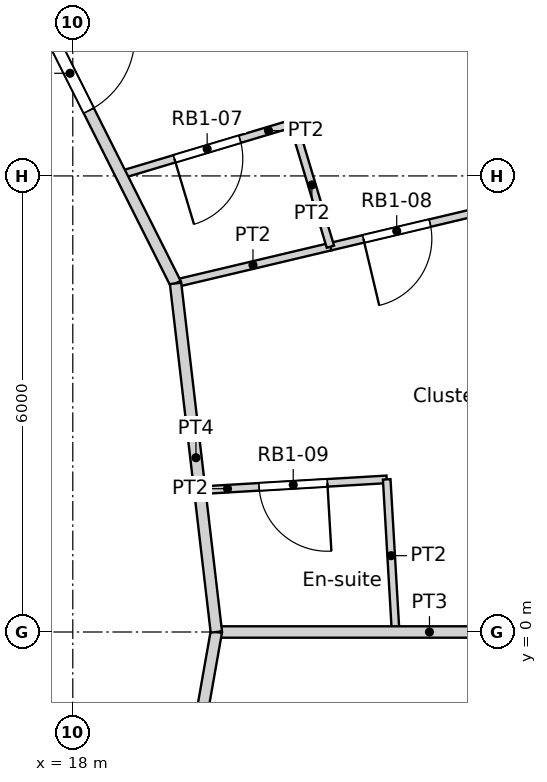
"""IFC4 building model, lengths in metres.
Left out: names, types, materials, properties, quantities, classifications, styles, units other than length and angle.
Written with IfcOpenShell. Run it as: python <this file> out.ifc"""

import sys

from ifc_helpers import new_model, si_unit, direction, frame, frame_2d, origin, origin_2d, place, context, subcontext, project, spatial, rectangle, circle, extrude, element, fill, save


model = new_model("IFC4")
c1 = context("Model", 3, precision=1e-05, world=origin(), true_north=direction((0.0, 1.0)))
c2 = subcontext(c1, "Body", "Model", "MODEL_VIEW")
j1 = project(units=[si_unit("LENGTHUNIT", "METRE"), si_unit("PLANEANGLEUNIT", "RADIAN")], contexts=[c1])
p1 = place(None, origin())
s1 = spatial("IfcSite", under=j1, at=p1, CompositionType="ELEMENT")
p2 = place(p1, origin())
s2 = spatial("IfcBuilding", under=s1, at=p2, CompositionType="ELEMENT")
p3 = place(p2, frame((0.0, 0.0, 126.0)))
s3 = spatial("IfcBuildingStorey", under=s2, at=p3, CompositionType="ELEMENT", Elevation=126.0)
for number, where, z_axis, x_axis in (
    (1, (18.822, 0.0, 0.0), (0.0, 0.0, 1.0), (1.0, 0.0, 0.0)),
    (2, (17.986, 5.548, 0.0), (0.0, 0.0, 1.0), (1.0, 0.0, 0.0)),
):
    element("IfcColumn", number, at=place(p3, frame(where, z_axis=z_axis, x_axis=x_axis)), inside=s3, PredefinedType="COLUMN", context=c2, shape_type="SweptSolid", body=[
        extrude(circle(Radius=0.65, at=origin_2d()), origin(), (0.0, 0.0, 1.0), 3.6),
    ])
p4 = place(p3, frame((15.235, 12.784, 0.0), z_axis=(0.0, 0.0, 1.0), x_axis=(0.448809691484, -0.893627361281, 0.0)))
e3 = element("IfcWall", 3, at=p4, inside=s3, PredefinedType="PARTITIONING", context=c2, shape_type="SweptSolid", body=[
    extrude(rectangle(XDim=9.174, YDim=0.15, at=frame_2d((4.587, 0.0))), origin(), (0.0, 0.0, 1.0), 3.3),
])
p5 = place(p4, frame((5.53, 0.0, 0.0)))
e4 = element("IfcOpeningElement", 4, at=p5, cuts=e3, PredefinedType="OPENING", context=c2, shape_type="SweptSolid", body=[
    extrude(rectangle(XDim=1.1, YDim=2.1, at=frame_2d((0.55, 1.05))), frame((0.0, 0.075, 0.0), z_axis=(0.0, -1.0, 0.0), x_axis=(1.0, 0.0, 0.0)), (0.0, 0.0, 1.0), 0.15),
])
p6 = place(p3, frame((19.352, 4.586, 0.0), z_axis=(0.0, 0.0, 1.0), x_axis=(0.116221510549, -0.993223318537, 0.0)))
e5 = element("IfcWall", 5, at=p6, inside=s3, PredefinedType="PARTITIONING", context=c2, shape_type="SweptSolid", body=[
    extrude(rectangle(XDim=4.617, YDim=0.15, at=frame_2d((2.309, 0.0))), origin(), (0.0, 0.0, 1.0), 3.3),
])
p7 = place(p3, frame((18.688, -6.802, 0.0), z_axis=(0.0, 0.0, 1.0), x_axis=(0.173728873845, 0.98479352069, 0.0)))
e6 = element("IfcWall", 6, at=p7, inside=s3, PredefinedType="PARTITIONING", context=c2, shape_type="SweptSolid", body=[
    extrude(rectangle(XDim=6.907, YDim=0.15, at=frame_2d((3.454, 0.0))), origin(), (0.0, 0.0, 1.0), 3.3),
])
p8 = place(p7, frame((2.953, 0.0, 0.0)))
e7 = element("IfcOpeningElement", 7, at=p8, cuts=e6, PredefinedType="OPENING", context=c2, shape_type="SweptSolid", body=[
    extrude(rectangle(XDim=1.0, YDim=2.04, at=frame_2d((0.5, 1.02))), frame((0.0, 0.075, 0.0), z_axis=(0.0, -1.0, 0.0), x_axis=(1.0, 0.0, 0.0)), (0.0, 0.0, 1.0), 0.15),
])
p9 = place(p3, frame((20.902, 6.694, 0.0), z_axis=(0.0, 0.0, 1.0), x_axis=(0.286978159246, -0.957937125346, 0.0)))
e8 = element("IfcWall", 8, at=p9, inside=s3, PredefinedType="PARTITIONING", context=c2, shape_type="SweptSolid", body=[
    extrude(rectangle(XDim=1.696, YDim=0.1, at=frame_2d((0.848, 0.0))), origin(), (0.0, 0.0, 1.0), 3.3),
])
p10 = place(p3, frame((18.634, 6.015, 0.0), z_axis=(0.0, 0.0, 1.0), x_axis=(0.957968074201, 0.286874831262, 0.0)))
e9 = element("IfcWall", 9, at=p10, inside=s3, PredefinedType="PARTITIONING", context=c2, shape_type="SweptSolid", body=[
    extrude(rectangle(XDim=2.368, YDim=0.1, at=frame_2d((1.184, 0.0))), origin(), (0.0, 0.0, 1.0), 3.3),
])
p11 = place(p10, frame((0.733, 0.0, 0.0)))
e10 = element("IfcOpeningElement", 10, at=p11, cuts=e9, PredefinedType="OPENING", context=c2, shape_type="SweptSolid", body=[
    extrude(rectangle(XDim=0.9, YDim=2.0, at=frame_2d((0.45, 1.0))), frame((0.0, 0.05, 0.0), z_axis=(0.0, -1.0, 0.0), x_axis=(1.0, 0.0, 0.0)), (0.0, 0.0, 1.0), 0.1),
])
p12 = place(p3, frame((21.389, 5.069, 0.0), z_axis=(0.0, 0.0, 1.0), x_axis=(0.973047083334, 0.2306065342, 0.0)))
e11 = element("IfcWall", 11, at=p12, inside=s3, PredefinedType="PARTITIONING", context=c2, shape_type="SweptSolid", body=[
    extrude(rectangle(XDim=3.516, YDim=0.1, at=frame_2d((1.758, 0.0))), origin(), (0.0, 0.0, 1.0), 3.3),
])
p13 = place(p12, frame((0.447, 0.0, 0.0)))
e12 = element("IfcOpeningElement", 12, at=p13, cuts=e11, PredefinedType="OPENING", context=c2, shape_type="SweptSolid", body=[
    extrude(rectangle(XDim=0.9, YDim=2.1, at=frame_2d((0.45, 1.05))), frame((0.0, 0.05, 0.0), z_axis=(0.0, -1.0, 0.0), x_axis=(1.0, 0.0, 0.0)), (0.0, 0.0, 1.0), 0.1),
])
p14 = place(p3, frame((19.352, 4.586, 0.0), z_axis=(0.0, 0.0, 1.0), x_axis=(0.973001078158, 0.230800567383, 0.0)))
e13 = element("IfcWall", 13, at=p14, inside=s3, PredefinedType="PARTITIONING", context=c2, shape_type="SweptSolid", body=[
    extrude(rectangle(XDim=2.094, YDim=0.1, at=frame_2d((1.047, 0.0))), origin(), (0.0, 0.0, 1.0), 3.3),
])
p15 = place(p3, frame((22.13, 2.008, 0.0), z_axis=(0.0, 0.0, 1.0), x_axis=(0.058259538708, -0.998301470574, 0.0)))
e14 = element("IfcWall", 14, at=p15, inside=s3, PredefinedType="PARTITIONING", context=c2, shape_type="SweptSolid", body=[
    extrude(rectangle(XDim=2.011, YDim=0.1, at=frame_2d((1.006, 0.0))), origin(), (0.0, 0.0, 1.0), 3.3),
])
p16 = place(p3, frame((19.67, 1.864, 0.0), z_axis=(0.0, 0.0, 1.0), x_axis=(0.998290052933, 0.058454856216, 0.0)))
e15 = element("IfcWall", 15, at=p16, inside=s3, PredefinedType="PARTITIONING", context=c2, shape_type="SweptSolid", body=[
    extrude(rectangle(XDim=2.464, YDim=0.1, at=frame_2d((1.232, 0.0))), origin(), (0.0, 0.0, 1.0), 3.3),
])
p17 = place(p16, frame((0.782, 0.0, 0.0)))
e16 = element("IfcOpeningElement", 16, at=p17, cuts=e15, PredefinedType="OPENING", context=c2, shape_type="SweptSolid", body=[
    extrude(rectangle(XDim=0.9, YDim=2.04, at=frame_2d((0.45, 1.02))), frame((0.0, 0.05, 0.0), z_axis=(0.0, -1.0, 0.0), x_axis=(1.0, 0.0, 0.0)), (0.0, 0.0, 1.0), 0.1),
])
p18 = place(p3, frame((19.888, 0.0, 0.0), z_axis=(0.0, 0.0, 1.0), x_axis=(1.0, 0.0, 0.0)))
e17 = element("IfcWall", 17, at=p18, inside=s3, PredefinedType="PARTITIONING", context=c2, shape_type="SweptSolid", body=[
    extrude(rectangle(XDim=5.609, YDim=0.15, at=frame_2d((2.805, 0.0))), origin(), (0.0, 0.0, 1.0), 3.3),
])
p19 = place(p5, origin())
e18 = element("IfcDoor", 18, at=p19, inside=s3, OperationType="SINGLE_SWING_LEFT", PredefinedType="DOOR", context=c2, shape_type="SweptSolid", body=[
    extrude(rectangle(XDim=1.1, YDim=2.1, at=frame_2d((0.55, 1.05))), frame((0.0, 0.025, 0.0), z_axis=(0.0, -1.0, 0.0), x_axis=(1.0, 0.0, 0.0)), (0.0, 0.0, 1.0), 0.05),
])
fill(e4, e18)
p20 = place(p11, origin())
e19 = element("IfcDoor", 19, at=p20, inside=s3, OperationType="SINGLE_SWING_RIGHT", PredefinedType="DOOR", context=c2, shape_type="SweptSolid", body=[
    extrude(rectangle(XDim=0.9, YDim=2.0, at=frame_2d((0.45, 1.0))), frame((0.0, 0.025, 0.0), z_axis=(0.0, -1.0, 0.0), x_axis=(1.0, 0.0, 0.0)), (0.0, 0.0, 1.0), 0.05),
])
fill(e10, e19)
p21 = place(p13, origin())
e20 = element("IfcDoor", 20, at=p21, inside=s3, OperationType="SINGLE_SWING_RIGHT", PredefinedType="DOOR", context=c2, shape_type="SweptSolid", body=[
    extrude(rectangle(XDim=0.9, YDim=2.1, at=frame_2d((0.45, 1.05))), frame((0.0, 0.025, 0.0), z_axis=(0.0, -1.0, 0.0), x_axis=(1.0, 0.0, 0.0)), (0.0, 0.0, 1.0), 0.05),
])
fill(e12, e20)
p22 = place(p17, origin())
e21 = element("IfcDoor", 21, at=p22, inside=s3, OperationType="SINGLE_SWING_LEFT", PredefinedType="DOOR", context=c2, shape_type="SweptSolid", body=[
    extrude(rectangle(XDim=0.9, YDim=2.04, at=frame_2d((0.45, 1.02))), frame((0.0, 0.025, 0.0), z_axis=(0.0, -1.0, 0.0), x_axis=(1.0, 0.0, 0.0)), (0.0, 0.0, 1.0), 0.05),
])
fill(e16, e21)
save(model, sys.argv[1])
